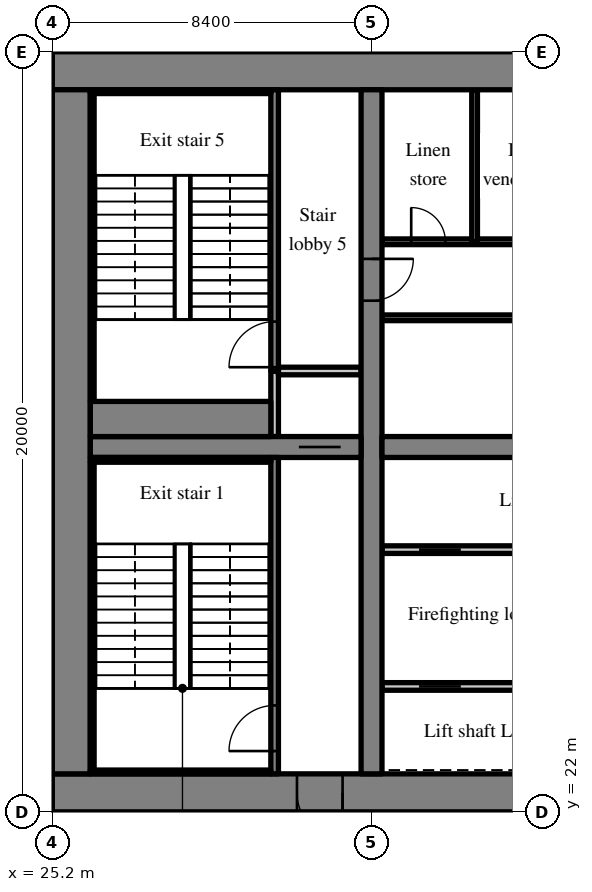
"""IFC4 building model, lengths in metres.
Left out: names, types, materials, properties, quantities, classifications, styles, units other than length and angle.
Written with IfcOpenShell. Run it as: python <this file> out.ifc"""

import sys

from ifc_helpers import new_model, si_unit, direction, frame, frame_2d, origin, place, context, subcontext, project, spatial, rectangle, extrude, source, transform, mapped, element, fill, save


model = new_model("IFC4")
c1 = context("Model", 3, precision=1e-05, world=origin(), true_north=direction((0.0, 1.0)))
c2 = subcontext(c1, "Body", "Model", "MODEL_VIEW")
j1 = project(units=[si_unit("LENGTHUNIT", "METRE"), si_unit("PLANEANGLEUNIT", "RADIAN")], contexts=[c1])
p1 = place(None, origin())
s1 = spatial("IfcSite", under=j1, at=p1, CompositionType="ELEMENT")
p2 = place(p1, origin())
s2 = spatial("IfcBuilding", under=s1, at=p2, CompositionType="ELEMENT")
p3 = place(p2, frame((0.0, 0.0, 50.6)))
s3 = spatial("IfcBuildingStorey", under=s2, at=p3, CompositionType="ELEMENT", Elevation=50.6)
m1 = source(origin(), c2, "Body", "SweptSolid", [
    extrude(rectangle(XDim=50.4, YDim=1.0, at=frame_2d((25.2, 0.0))), origin(), (0.0, 0.0, 1.0), 3.52),
])
p4 = place(p3, frame((25.2, 22.5, 0.0), z_axis=(0.0, 0.0, 1.0), x_axis=(1.0, 0.0, 0.0)))
e1 = element("IfcWall", 1, at=p4, inside=s3, PredefinedType="SHEAR", context=c2, shape_type="MappedRepresentation", body=[
    mapped(m1, transform((0.0, 0.0, 0.0), scale=1.0)),
])
m2 = source(origin(), c2, "Body", "SweptSolid", [
    extrude(rectangle(XDim=1.8, YDim=2.1, at=frame_2d((0.9, 1.05))), frame((0.0, 0.51, 0.0), z_axis=(0.0, -1.0, 0.0), x_axis=(1.0, 0.0, 0.0)), (0.0, 0.0, 1.0), 1.02),
])
p5 = place(p4, frame((15.9, 0.0, 0.0)))
e2 = element("IfcOpeningElement", 2, at=p5, cuts=e1, PredefinedType="OPENING", context=c2, shape_type="MappedRepresentation", body=[
    mapped(m2, transform((0.0, 0.0, 0.0), scale=1.0)),
])
m3 = source(origin(), c2, "Body", "SweptSolid", [
    extrude(rectangle(XDim=1.2, YDim=2.1, at=frame_2d((0.6, 1.05))), frame((0.0, 0.51, 0.0), z_axis=(0.0, -1.0, 0.0), x_axis=(1.0, 0.0, 0.0)), (0.0, 0.0, 1.0), 1.02),
])
p6 = place(p4, frame((26.987, 0.0, 0.0)))
e3 = element("IfcOpeningElement", 3, at=p6, cuts=e1, PredefinedType="OPENING", context=c2, shape_type="MappedRepresentation", body=[
    mapped(m3, transform((0.0, 0.0, 0.0), scale=1.0)),
])
m4 = source(origin(), c2, "Body", "SweptSolid", [
    extrude(rectangle(XDim=0.9, YDim=2.1, at=frame_2d((0.45, 1.05))), frame((0.0, 0.51, 0.0), z_axis=(0.0, -1.0, 0.0), x_axis=(1.0, 0.0, 0.0)), (0.0, 0.0, 1.0), 1.02),
])
p7 = place(p4, frame((33.75, 0.0, 0.0)))
e4 = element("IfcOpeningElement", 4, at=p7, cuts=e1, PredefinedType="OPENING", context=c2, shape_type="MappedRepresentation", body=[
    mapped(m4, transform((0.0, 0.0, 0.0), scale=1.0)),
])
p8 = place(p4, frame((30.75, 0.0, 0.0)))
e5 = element("IfcOpeningElement", 5, at=p8, cuts=e1, PredefinedType="OPENING", context=c2, shape_type="MappedRepresentation", body=[
    mapped(m4, transform((0.0, 0.0, 0.0), scale=1.0)),
])
p9 = place(p4, frame((38.262, 0.0, 0.0)))
e6 = element("IfcOpeningElement", 6, at=p9, cuts=e1, PredefinedType="OPENING", context=c2, shape_type="MappedRepresentation", body=[
    mapped(m4, transform((0.0, 0.0, 0.0), scale=1.0)),
])
p10 = place(p4, frame((6.438, 0.0, 0.0)))
e7 = element("IfcOpeningElement", 7, at=p10, cuts=e1, PredefinedType="OPENING", context=c2, shape_type="MappedRepresentation", body=[
    mapped(m3, transform((0.0, 0.0, 0.0), scale=1.0)),
])
p11 = place(p4, frame((47.725, 0.0, 0.0)))
e8 = element("IfcOpeningElement", 8, at=p11, cuts=e1, PredefinedType="OPENING", context=c2, shape_type="MappedRepresentation", body=[
    mapped(m3, transform((0.0, 0.0, 0.0), scale=1.0)),
])
p12 = place(p3, frame((25.2, 41.5, 0.0), z_axis=(0.0, 0.0, 1.0), x_axis=(1.0, 0.0, 0.0)))
e9 = element("IfcWall", 9, at=p12, inside=s3, PredefinedType="SHEAR", context=c2, shape_type="MappedRepresentation", body=[
    mapped(m1, transform((0.0, 0.0, 0.0), scale=1.0)),
])
m5 = source(origin(), c2, "Body", "SweptSolid", [
    extrude(rectangle(XDim=18.0, YDim=1.0, at=frame_2d((9.0, 0.0))), origin(), (0.0, 0.0, 1.0), 3.52),
])
p13 = place(p3, frame((25.7, 23.0, 0.0), z_axis=(0.0, 0.0, 1.0), x_axis=(0.0, 1.0, 0.0)))
e10 = element("IfcWall", 10, at=p13, inside=s3, PredefinedType="SHEAR", context=c2, shape_type="MappedRepresentation", body=[
    mapped(m5, transform((0.0, 0.0, 0.0), scale=1.0)),
])
m6 = source(origin(), c2, "Body", "SweptSolid", [
    extrude(rectangle(XDim=18.0, YDim=0.55, at=frame_2d((9.0, 0.0))), origin(), (0.0, 0.0, 1.0), 3.52),
])
p14 = place(p3, frame((33.6, 23.0, 0.0), z_axis=(0.0, 0.0, 1.0), x_axis=(0.0, 1.0, 0.0)))
e11 = element("IfcWall", 11, at=p14, inside=s3, PredefinedType="SHEAR", context=c2, shape_type="MappedRepresentation", body=[
    mapped(m6, transform((0.0, 0.0, 0.0), scale=1.0)),
])
m7 = source(origin(), c2, "Body", "SweptSolid", [
    extrude(rectangle(XDim=1.1, YDim=2.1, at=frame_2d((0.55, 1.05))), frame((0.0, 0.285, 0.0), z_axis=(0.0, -1.0, 0.0), x_axis=(1.0, 0.0, 0.0)), (0.0, 0.0, 1.0), 0.57),
])
p15 = place(p14, frame((12.45, 0.0, 0.0)))
e12 = element("IfcOpeningElement", 12, at=p15, cuts=e11, PredefinedType="OPENING", context=c2, shape_type="MappedRepresentation", body=[
    mapped(m7, transform((0.0, 0.0, 0.0), scale=1.0)),
])
m8 = source(origin(), c2, "Body", "SweptSolid", [
    extrude(rectangle(XDim=7.125, YDim=0.55, at=frame_2d((3.562, 0.0))), origin(), (0.0, 0.0, 1.0), 3.52),
])
p16 = place(p3, frame((26.2, 31.6, 0.0), z_axis=(0.0, 0.0, 1.0), x_axis=(1.0, 0.0, 0.0)))
e13 = element("IfcWall", 13, at=p16, inside=s3, PredefinedType="SHEAR", context=c2, shape_type="MappedRepresentation", body=[
    mapped(m8, transform((0.0, 0.0, 0.0), scale=1.0)),
])
p17 = place(p16, frame((5.488, 0.0, 0.0)))
e14 = element("IfcOpeningElement", 14, at=p17, cuts=e13, PredefinedType="OPENING", context=c2, shape_type="MappedRepresentation", body=[
    mapped(m7, transform((0.0, 0.0, 0.0), scale=1.0)),
])
m9 = source(origin(), c2, "Body", "SweptSolid", [
    extrude(rectangle(XDim=16.25, YDim=0.55, at=frame_2d((8.125, 0.0))), origin(), (0.0, 0.0, 1.0), 3.52),
])
p18 = place(p3, frame((33.875, 31.6, 0.0), z_axis=(0.0, 0.0, 1.0), x_axis=(1.0, 0.0, 0.0)))
e15 = element("IfcWall", 15, at=p18, inside=s3, PredefinedType="SHEAR", context=c2, shape_type="MappedRepresentation", body=[
    mapped(m9, transform((0.0, 0.0, 0.0), scale=1.0)),
])
m10 = source(origin(), c2, "Body", "SweptSolid", [
    extrude(rectangle(XDim=1.0, YDim=2.1, at=frame_2d((0.5, 1.05))), frame((0.0, 0.285, 0.0), z_axis=(0.0, -1.0, 0.0), x_axis=(1.0, 0.0, 0.0)), (0.0, 0.0, 1.0), 0.57),
])
p19 = place(p18, frame((14.687, 0.0, 0.0)))
e16 = element("IfcOpeningElement", 16, at=p19, cuts=e15, PredefinedType="OPENING", context=c2, shape_type="MappedRepresentation", body=[
    mapped(m10, transform((0.0, 0.0, 0.0), scale=1.0)),
])
m11 = source(origin(), c2, "Body", "SweptSolid", [
    extrude(rectangle(XDim=3.559, YDim=0.3, at=frame_2d((1.78, 0.0))), origin(), (0.0, 0.0, 1.0), 3.52),
])
p20 = place(p3, frame((25.55, 39.969, 0.0), z_axis=(0.0, 0.0, 1.0), x_axis=(-0.35779745313, 0.933799219604, 0.0)))
e17 = element("IfcWall", 17, at=p20, inside=s3, PredefinedType="SOLIDWALL", context=c2, shape_type="MappedRepresentation", body=[
    mapped(m11, transform((0.0, 0.0, 0.0), scale=1.0)),
])
m12 = source(origin(), c2, "Body", "SweptSolid", [
    extrude(rectangle(XDim=1.5, YDim=2.0, at=frame_2d((0.75, 1.0))), frame((0.0, 0.16, 0.0), z_axis=(0.0, -1.0, 0.0), x_axis=(1.0, 0.0, 0.0)), (0.0, 0.0, 1.0), 0.32),
])
p21 = place(p20, frame((1.903, 0.0, 0.9)))
e18 = element("IfcOpeningElement", 18, at=p21, cuts=e17, PredefinedType="OPENING", context=c2, shape_type="MappedRepresentation", body=[
    mapped(m12, transform((0.0, 0.0, 0.0), scale=1.0)),
])
m13 = source(origin(), c2, "Body", "SweptSolid", [
    extrude(rectangle(XDim=6.025, YDim=0.2, at=frame_2d((3.012, 0.0))), origin(), (0.0, 0.0, 1.0), 3.52),
])
p22 = place(p3, frame((33.875, 25.3, 0.0), z_axis=(0.0, 0.0, 1.0), x_axis=(1.0, 0.0, 0.0)))
e19 = element("IfcWall", 19, at=p22, inside=s3, PredefinedType="SOLIDWALL", context=c2, shape_type="MappedRepresentation", body=[
    mapped(m13, transform((0.0, 0.0, 0.0), scale=1.0)),
])
m14 = source(origin(), c2, "Body", "SweptSolid", [
    extrude(rectangle(XDim=1.1, YDim=2.1, at=frame_2d((0.55, 1.05))), frame((0.0, 0.11, 0.0), z_axis=(0.0, -1.0, 0.0), x_axis=(1.0, 0.0, 0.0)), (0.0, 0.0, 1.0), 0.22),
])
p23 = place(p22, frame((0.975, 0.0, 0.0)))
e20 = element("IfcOpeningElement", 20, at=p23, cuts=e19, PredefinedType="OPENING", context=c2, shape_type="MappedRepresentation", body=[
    mapped(m14, transform((0.0, 0.0, 0.0), scale=1.0)),
])
p24 = place(p22, frame((3.975, 0.0, 0.0)))
e21 = element("IfcOpeningElement", 21, at=p24, cuts=e19, PredefinedType="OPENING", context=c2, shape_type="MappedRepresentation", body=[
    mapped(m14, transform((0.0, 0.0, 0.0), scale=1.0)),
])
m15 = source(origin(), c2, "Body", "SweptSolid", [
    extrude(rectangle(XDim=12.025, YDim=0.2, at=frame_2d((6.012, 0.0))), origin(), (0.0, 0.0, 1.0), 3.52),
])
p25 = place(p3, frame((33.875, 28.9, 0.0), z_axis=(0.0, 0.0, 1.0), x_axis=(1.0, 0.0, 0.0)))
e22 = element("IfcWall", 22, at=p25, inside=s3, PredefinedType="SOLIDWALL", context=c2, shape_type="MappedRepresentation", body=[
    mapped(m15, transform((0.0, 0.0, 0.0), scale=1.0)),
])
p26 = place(p25, frame((0.975, 0.0, 0.0)))
e23 = element("IfcOpeningElement", 23, at=p26, cuts=e22, PredefinedType="OPENING", context=c2, shape_type="MappedRepresentation", body=[
    mapped(m14, transform((0.0, 0.0, 0.0), scale=1.0)),
])
p27 = place(p25, frame((3.975, 0.0, 0.0)))
e24 = element("IfcOpeningElement", 24, at=p27, cuts=e22, PredefinedType="OPENING", context=c2, shape_type="MappedRepresentation", body=[
    mapped(m14, transform((0.0, 0.0, 0.0), scale=1.0)),
])
p28 = place(p25, frame((6.975, 0.0, 0.0)))
e25 = element("IfcOpeningElement", 25, at=p28, cuts=e22, PredefinedType="OPENING", context=c2, shape_type="MappedRepresentation", body=[
    mapped(m14, transform((0.0, 0.0, 0.0), scale=1.0)),
])
p29 = place(p25, frame((9.975, 0.0, 0.0)))
e26 = element("IfcOpeningElement", 26, at=p29, cuts=e22, PredefinedType="OPENING", context=c2, shape_type="MappedRepresentation", body=[
    mapped(m14, transform((0.0, 0.0, 0.0), scale=1.0)),
])
m16 = source(origin(), c2, "Body", "SweptSolid", [
    extrude(rectangle(XDim=14.125, YDim=0.15, at=frame_2d((7.062, 0.0))), origin(), (0.0, 0.0, 1.0), 3.52),
])
p30 = place(p3, frame((33.875, 35.0, 0.0), z_axis=(0.0, 0.0, 1.0), x_axis=(1.0, 0.0, 0.0)))
e27 = element("IfcWall", 27, at=p30, inside=s3, PredefinedType="PARTITIONING", context=c2, shape_type="MappedRepresentation", body=[
    mapped(m16, transform((0.0, 0.0, 0.0), scale=1.0)),
])
m17 = source(origin(), c2, "Body", "SweptSolid", [
    extrude(rectangle(XDim=0.9, YDim=2.1, at=frame_2d((0.45, 1.05))), frame((0.0, 0.085, 0.0), z_axis=(0.0, -1.0, 0.0), x_axis=(1.0, 0.0, 0.0)), (0.0, 0.0, 1.0), 0.17),
])
p31 = place(p30, frame((6.575, 0.0, 0.0)))
e28 = element("IfcOpeningElement", 28, at=p31, cuts=e27, PredefinedType="OPENING", context=c2, shape_type="MappedRepresentation", body=[
    mapped(m17, transform((0.0, 0.0, 0.0), scale=1.0)),
])
m18 = source(origin(), c2, "Body", "SweptSolid", [
    extrude(rectangle(XDim=16.25, YDim=0.15, at=frame_2d((8.125, 0.0))), origin(), (0.0, 0.0, 1.0), 3.52),
])
p32 = place(p3, frame((33.875, 37.0, 0.0), z_axis=(0.0, 0.0, 1.0), x_axis=(1.0, 0.0, 0.0)))
e29 = element("IfcWall", 29, at=p32, inside=s3, PredefinedType="PARTITIONING", context=c2, shape_type="MappedRepresentation", body=[
    mapped(m18, transform((0.0, 0.0, 0.0), scale=1.0)),
])
p33 = place(p32, frame((0.769, 0.0, 0.0)))
e30 = element("IfcOpeningElement", 30, at=p33, cuts=e29, PredefinedType="OPENING", context=c2, shape_type="MappedRepresentation", body=[
    mapped(m17, transform((0.0, 0.0, 0.0), scale=1.0)),
])
p34 = place(p32, frame((3.613, 0.0, 0.0)))
e31 = element("IfcOpeningElement", 31, at=p34, cuts=e29, PredefinedType="OPENING", context=c2, shape_type="MappedRepresentation", body=[
    mapped(m17, transform((0.0, 0.0, 0.0), scale=1.0)),
])
p35 = place(p32, frame((9.3, 0.0, 0.0)))
e32 = element("IfcOpeningElement", 32, at=p35, cuts=e29, PredefinedType="OPENING", context=c2, shape_type="MappedRepresentation", body=[
    mapped(m17, transform((0.0, 0.0, 0.0), scale=1.0)),
])
p36 = place(p32, frame((14.581, 0.0, 0.0)))
e33 = element("IfcOpeningElement", 33, at=p36, cuts=e29, PredefinedType="OPENING", context=c2, shape_type="MappedRepresentation", body=[
    mapped(m17, transform((0.0, 0.0, 0.0), scale=1.0)),
])
m19 = source(origin(), c2, "Body", "SweptSolid", [
    extrude(rectangle(XDim=4.0, YDim=0.15, at=frame_2d((2.0, 0.0))), origin(), (0.0, 0.0, 1.0), 3.52),
])
p37 = place(p3, frame((36.312, 37.0, 0.0), z_axis=(0.0, 0.0, 1.0), x_axis=(0.0, 1.0, 0.0)))
e34 = element("IfcWall", 34, at=p37, inside=s3, PredefinedType="PARTITIONING", context=c2, shape_type="MappedRepresentation", body=[
    mapped(m19, transform((0.0, 0.0, 0.0), scale=1.0)),
])
m20 = source(origin(), c2, "Body", "SweptSolid", [
    extrude(rectangle(XDim=8.325, YDim=0.2, at=frame_2d((4.163, 0.0))), origin(), (0.0, 0.0, 1.0), 3.52),
])
p38 = place(p3, frame((31.05, 23.0, 0.0), z_axis=(0.0, 0.0, 1.0), x_axis=(0.0, 1.0, 0.0)))
e35 = element("IfcWall", 35, at=p38, inside=s3, PredefinedType="SOLIDWALL", context=c2, shape_type="MappedRepresentation", body=[
    mapped(m20, transform((0.0, 0.0, 0.0), scale=1.0)),
])
m21 = source(origin(), c2, "Body", "SweptSolid", [
    extrude(rectangle(XDim=1.2, YDim=2.1, at=frame_2d((0.6, 1.05))), frame((0.0, 0.11, 0.0), z_axis=(0.0, -1.0, 0.0), x_axis=(1.0, 0.0, 0.0)), (0.0, 0.0, 1.0), 0.22),
])
p39 = place(p38, frame((0.6, 0.0, 0.0)))
e36 = element("IfcOpeningElement", 36, at=p39, cuts=e35, PredefinedType="OPENING", context=c2, shape_type="MappedRepresentation", body=[
    mapped(m21, transform((0.0, 0.0, 0.0), scale=1.0)),
])
m22 = source(origin(), c2, "Body", "SweptSolid", [
    extrude(rectangle(XDim=1.725, YDim=0.2, at=frame_2d((0.863, 0.0))), origin(), (0.0, 0.0, 1.0), 3.52),
])
p40 = place(p3, frame((31.05, 31.875, 0.0), z_axis=(0.0, 0.0, 1.0), x_axis=(0.0, 1.0, 0.0)))
e37 = element("IfcWall", 37, at=p40, inside=s3, PredefinedType="SOLIDWALL", context=c2, shape_type="MappedRepresentation", body=[
    mapped(m22, transform((0.0, 0.0, 0.0), scale=1.0)),
])
m23 = source(origin(), c2, "Body", "SweptSolid", [
    extrude(rectangle(XDim=2.175, YDim=0.2, at=frame_2d((1.087, 0.0))), origin(), (0.0, 0.0, 1.0), 3.52),
])
p41 = place(p3, frame((31.15, 33.6, 0.0), z_axis=(0.0, 0.0, 1.0), x_axis=(1.0, 0.0, 0.0)))
e38 = element("IfcWall", 38, at=p41, inside=s3, PredefinedType="SOLIDWALL", context=c2, shape_type="MappedRepresentation", body=[
    mapped(m23, transform((0.0, 0.0, 0.0), scale=1.0)),
])
m24 = source(origin(), c2, "Body", "SweptSolid", [
    extrude(rectangle(XDim=7.4, YDim=0.2, at=frame_2d((3.7, 0.0))), origin(), (0.0, 0.0, 1.0), 3.52),
])
p42 = place(p3, frame((31.05, 33.6, 0.0), z_axis=(0.0, 0.0, 1.0), x_axis=(0.0, 1.0, 0.0)))
e39 = element("IfcWall", 39, at=p42, inside=s3, PredefinedType="SOLIDWALL", context=c2, shape_type="MappedRepresentation", body=[
    mapped(m24, transform((0.0, 0.0, 0.0), scale=1.0)),
])
p43 = place(p42, frame((0.1, 0.0, 0.0)))
e40 = element("IfcOpeningElement", 40, at=p43, cuts=e39, PredefinedType="OPENING", context=c2, shape_type="MappedRepresentation", body=[
    mapped(m21, transform((0.0, 0.0, 0.0), scale=1.0)),
])
m25 = source(origin(), c2, "Body", "SweptSolid", [
    extrude(rectangle(XDim=8.2, YDim=0.2, at=frame_2d((4.1, 0.0))), origin(), (0.0, 0.0, 1.0), 3.52),
])
p44 = place(p3, frame((17.0, 22.1, 0.0), z_axis=(0.0, 0.0, 1.0), x_axis=(1.0, 0.0, 0.0)))
e41 = element("IfcWall", 41, at=p44, inside=s3, PredefinedType="SOLIDWALL", context=c2, shape_type="MappedRepresentation", body=[
    mapped(m25, transform((0.0, 0.0, 0.0), scale=1.0)),
])
p45 = place(p44, frame((6.0, 0.0, 0.0)))
e42 = element("IfcOpeningElement", 42, at=p45, cuts=e41, PredefinedType="OPENING", context=c2, shape_type="MappedRepresentation", body=[
    mapped(m21, transform((0.0, 0.0, 0.0), scale=1.0)),
])
p46 = place(p3, frame((17.0, 30.4, 0.0), z_axis=(0.0, 0.0, 1.0), x_axis=(1.0, 0.0, 0.0)))
e43 = element("IfcWall", 43, at=p46, inside=s3, PredefinedType="SOLIDWALL", context=c2, shape_type="MappedRepresentation", body=[
    mapped(m25, transform((0.0, 0.0, 0.0), scale=1.0)),
])
m26 = source(origin(), c2, "Body", "SweptSolid", [
    extrude(rectangle(XDim=1.0, YDim=2.1, at=frame_2d((0.5, 1.05))), frame((0.0, 0.11, 0.0), z_axis=(0.0, -1.0, 0.0), x_axis=(1.0, 0.0, 0.0)), (0.0, 0.0, 1.0), 0.22),
])
p47 = place(p46, frame((6.1, 0.0, 0.0)))
e44 = element("IfcOpeningElement", 44, at=p47, cuts=e43, PredefinedType="OPENING", context=c2, shape_type="MappedRepresentation", body=[
    mapped(m26, transform((0.0, 0.0, 0.0), scale=1.0)),
])
m27 = source(origin(), c2, "Body", "SweptSolid", [
    extrude(rectangle(XDim=4.75, YDim=0.1, at=frame_2d((2.375, 0.0))), origin(), (0.0, 0.0, 1.0), 3.52),
])
p48 = place(p3, frame((26.2, 23.05, 0.0), z_axis=(0.0, 0.0, 1.0), x_axis=(1.0, 0.0, 0.0)))
e45 = element("IfcWall", 45, at=p48, inside=s3, PredefinedType="SOLIDWALL", context=c2, shape_type="MappedRepresentation", body=[
    mapped(m27, transform((0.0, 0.0, 0.0), scale=1.0)),
])
m28 = source(origin(), c2, "Body", "SweptSolid", [
    extrude(rectangle(XDim=4.75, YDim=0.125, at=frame_2d((2.375, 0.0))), origin(), (0.0, 0.0, 1.0), 3.52),
])
p49 = place(p3, frame((26.2, 31.262, 0.0), z_axis=(0.0, 0.0, 1.0), x_axis=(1.0, 0.0, 0.0)))
e46 = element("IfcWall", 46, at=p49, inside=s3, PredefinedType="SOLIDWALL", context=c2, shape_type="MappedRepresentation", body=[
    mapped(m28, transform((0.0, 0.0, 0.0), scale=1.0)),
])
m29 = source(origin(), c2, "Body", "SweptSolid", [
    extrude(rectangle(XDim=8.1, YDim=0.1, at=frame_2d((4.05, 0.0))), origin(), (0.0, 0.0, 1.0), 3.52),
])
p50 = place(p3, frame((26.25, 23.1, 0.0), z_axis=(0.0, 0.0, 1.0), x_axis=(0.0, 1.0, 0.0)))
e47 = element("IfcWall", 47, at=p50, inside=s3, PredefinedType="SOLIDWALL", context=c2, shape_type="MappedRepresentation", body=[
    mapped(m29, transform((0.0, 0.0, 0.0), scale=1.0)),
])
p51 = place(p3, frame((26.2, 40.95, 0.0), z_axis=(0.0, 0.0, 1.0), x_axis=(1.0, 0.0, 0.0)))
e48 = element("IfcWall", 48, at=p51, inside=s3, PredefinedType="SOLIDWALL", context=c2, shape_type="MappedRepresentation", body=[
    mapped(m27, transform((0.0, 0.0, 0.0), scale=1.0)),
])
m30 = source(origin(), c2, "Body", "SweptSolid", [
    extrude(rectangle(XDim=4.75, YDim=0.925, at=frame_2d((2.375, 0.0))), origin(), (0.0, 0.0, 1.0), 3.52),
])
p52 = place(p3, frame((26.2, 32.337, 0.0), z_axis=(0.0, 0.0, 1.0), x_axis=(1.0, 0.0, 0.0)))
e49 = element("IfcWall", 49, at=p52, inside=s3, PredefinedType="SOLIDWALL", context=c2, shape_type="MappedRepresentation", body=[
    mapped(m30, transform((0.0, 0.0, 0.0), scale=1.0)),
])
p53 = place(p3, frame((26.25, 32.8, 0.0), z_axis=(0.0, 0.0, 1.0), x_axis=(0.0, 1.0, 0.0)))
e50 = element("IfcWall", 50, at=p53, inside=s3, PredefinedType="SOLIDWALL", context=c2, shape_type="MappedRepresentation", body=[
    mapped(m29, transform((0.0, 0.0, 0.0), scale=1.0)),
])
m31 = source(origin(), c2, "Body", "SweptSolid", [
    extrude(rectangle(XDim=1.1, YDim=2.1, at=frame_2d((0.55, 1.05))), frame((0.0, 0.025, 0.0), z_axis=(0.0, -1.0, 0.0), x_axis=(1.0, 0.0, 0.0)), (0.0, 0.0, 1.0), 0.05),
])
p54 = place(p23, origin())
e51 = element("IfcDoor", 51, at=p54, inside=s3, OperationType="SLIDING_TO_LEFT", PredefinedType="DOOR", context=c2, shape_type="MappedRepresentation", body=[
    mapped(m31, transform((0.0, 0.0, 0.0), scale=1.0)),
])
fill(e20, e51)
p55 = place(p26, origin())
e52 = element("IfcDoor", 52, at=p55, inside=s3, OperationType="SLIDING_TO_LEFT", PredefinedType="DOOR", context=c2, shape_type="MappedRepresentation", body=[
    mapped(m31, transform((0.0, 0.0, 0.0), scale=1.0)),
])
fill(e23, e52)
m32 = source(origin(), c2, "Body", "SweptSolid", [
    extrude(rectangle(XDim=0.9, YDim=2.1, at=frame_2d((0.45, 1.05))), frame((0.0, 0.025, 0.0), z_axis=(0.0, -1.0, 0.0), x_axis=(1.0, 0.0, 0.0)), (0.0, 0.0, 1.0), 0.05),
])
p56 = place(p33, origin())
e53 = element("IfcDoor", 53, at=p56, inside=s3, OperationType="SINGLE_SWING_LEFT", PredefinedType="DOOR", context=c2, shape_type="MappedRepresentation", body=[
    mapped(m32, transform((0.0, 0.0, 0.0), scale=1.0)),
])
fill(e30, e53)
m33 = source(origin(), c2, "Body", "SweptSolid", [
    extrude(rectangle(XDim=1.2, YDim=2.1, at=frame_2d((0.6, 1.05))), frame((0.0, 0.025, 0.0), z_axis=(0.0, -1.0, 0.0), x_axis=(1.0, 0.0, 0.0)), (0.0, 0.0, 1.0), 0.05),
])
p57 = place(p39, origin())
e54 = element("IfcDoor", 54, at=p57, inside=s3, OperationType="SINGLE_SWING_LEFT", PredefinedType="DOOR", context=c2, shape_type="MappedRepresentation", body=[
    mapped(m33, transform((0.0, 0.0, 0.0), scale=1.0)),
])
fill(e36, e54)
m34 = source(origin(), c2, "Body", "SweptSolid", [
    extrude(rectangle(XDim=1.2, YDim=2.1, at=frame_2d((0.6, 1.05))), frame((0.0, 0.375, 0.0), z_axis=(0.0, -1.0, 0.0), x_axis=(1.0, 0.0, 0.0)), (0.0, 0.0, 1.0), 0.05),
])
p58 = place(p10, origin())
e55 = element("IfcDoor", 55, at=p58, inside=s3, OperationType="SINGLE_SWING_RIGHT", PredefinedType="DOOR", context=c2, shape_type="MappedRepresentation", body=[
    mapped(m34, transform((0.0, 0.0, 0.0), scale=1.0)),
])
fill(e7, e55)
p59 = place(p17, origin())
e56 = element("IfcDoor", 56, at=p59, inside=s3, OperationType="SLIDING_TO_LEFT", PredefinedType="DOOR", context=c2, shape_type="MappedRepresentation", body=[
    mapped(m31, transform((0.0, 0.0, 0.0), scale=1.0)),
])
fill(e14, e56)
p60 = place(p43, origin())
e57 = element("IfcDoor", 57, at=p60, inside=s3, OperationType="SINGLE_SWING_LEFT", PredefinedType="DOOR", context=c2, shape_type="MappedRepresentation", body=[
    mapped(m33, transform((0.0, 0.0, 0.0), scale=1.0)),
])
fill(e40, e57)
p61 = place(p15, origin())
e58 = element("IfcDoor", 58, at=p61, inside=s3, OperationType="SINGLE_SWING_RIGHT", PredefinedType="DOOR", context=c2, shape_type="MappedRepresentation", body=[
    mapped(m31, transform((0.0, 0.0, 0.0), scale=1.0)),
])
fill(e12, e58)
save(model, sys.argv[1])
